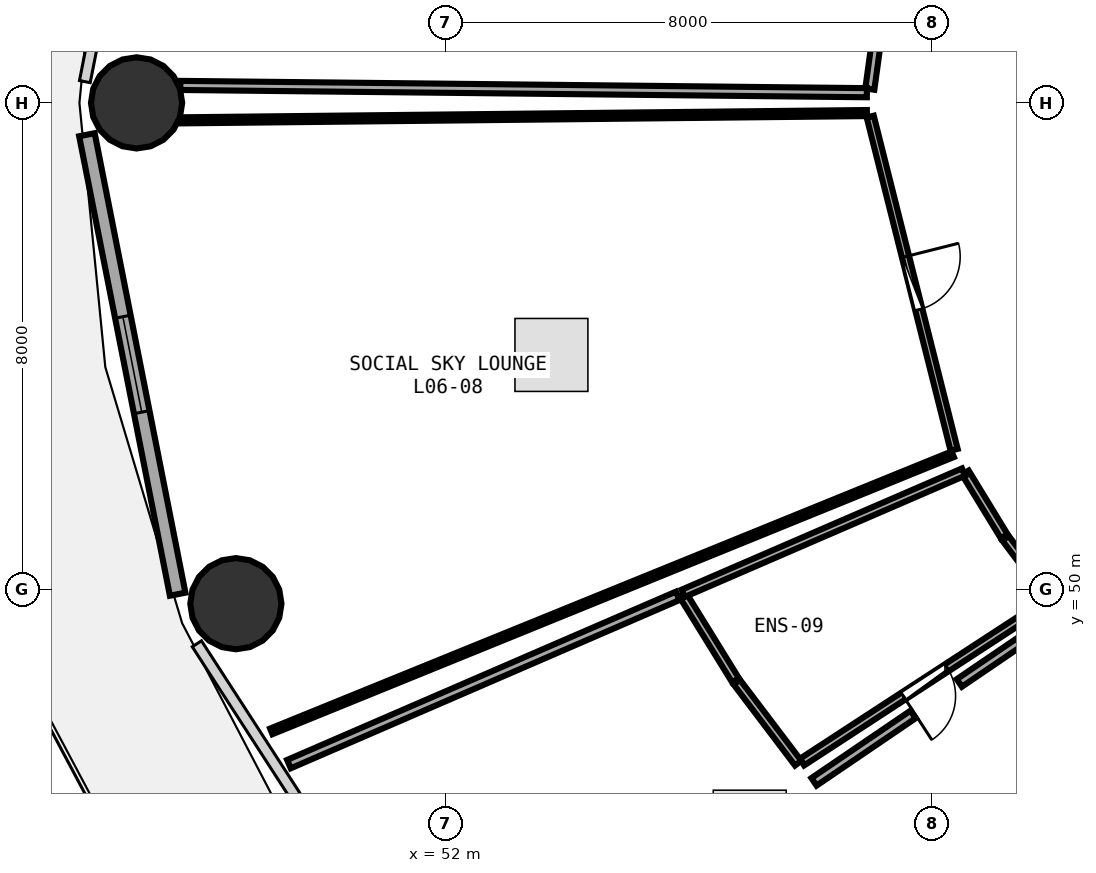
"""IFC4 building model, lengths in metres.
Left out: names, types, materials, properties, quantities, classifications, styles, units other than length and angle.
Written with IfcOpenShell. Run it as: python <this file> out.ifc"""

import sys

from ifc_helpers import new_model, si_unit, direction, frame, frame_2d, origin, origin_2d, place, context, subcontext, project, spatial, rectangle, circle, extrude, element, fill, save


model = new_model("IFC4")
c1 = context("Model", 3, precision=1e-05, world=origin(), true_north=direction((0.0, 1.0)))
c2 = subcontext(c1, "Body", "Model", "MODEL_VIEW")
j1 = project(units=[si_unit("LENGTHUNIT", "METRE"), si_unit("PLANEANGLEUNIT", "RADIAN")], contexts=[c1])
p1 = place(None, origin())
s1 = spatial("IfcSite", under=j1, at=p1, CompositionType="ELEMENT")
p2 = place(p1, origin())
s2 = spatial("IfcBuilding", under=s1, at=p2, CompositionType="ELEMENT")
p3 = place(p2, frame((0.0, 0.0, 26.25)))
s3 = spatial("IfcBuildingStorey", under=s2, at=p3, CompositionType="ELEMENT", Elevation=26.25)
for number, where, z_axis, x_axis in (
    (1, (46.92, 58.0, 0.0), (0.0, 0.0, 1.0), (1.0, 0.0, 0.0)),
    (2, (48.553, 49.764, 0.0), (0.0, 0.0, 1.0), (1.0, 0.0, 0.0)),
):
    element("IfcColumn", number, at=place(p3, frame(where, z_axis=z_axis, x_axis=x_axis)), inside=s3, PredefinedType="COLUMN", context=c2, shape_type="SweptSolid", body=[
        extrude(circle(Radius=0.75, at=origin_2d()), origin(), (0.0, 0.0, 1.0), 3.75),
    ])
p4 = place(p3, frame((46.104, 57.477, 0.0), z_axis=(0.0, 0.0, 1.0), x_axis=(0.193726159581, -0.98105564322, 0.0)))
e3 = element("IfcWall", 3, at=p4, inside=s3, PredefinedType="SOLIDWALL", context=c2, shape_type="SweptSolid", body=[
    extrude(rectangle(XDim=7.703, YDim=0.26, at=frame_2d((3.851, 0.0))), origin(), (0.0, 0.0, 1.0), 3.475),
])
p5 = place(p4, frame((3.051, 0.0, 0.85)))
e4 = element("IfcOpeningElement", 4, at=p5, cuts=e3, PredefinedType="OPENING", context=c2, shape_type="SweptSolid", body=[
    extrude(rectangle(XDim=1.6, YDim=1.45, at=frame_2d((0.8, 0.725))), frame((0.0, 0.14, 0.0), z_axis=(0.0, -1.0, 0.0), x_axis=(1.0, 0.0, 0.0)), (0.0, 0.0, 1.0), 0.28),
])
p6 = place(p3, frame((59.375, 61.115, 0.0), z_axis=(0.0, 0.0, 1.0), x_axis=(-0.135838186105, -0.990731036758, 0.0)))
e5 = element("IfcWall", 5, at=p6, inside=s3, PredefinedType="PARTITIONING", context=c2, shape_type="SweptSolid", body=[
    extrude(rectangle(XDim=2.915, YDim=0.15, at=frame_2d((1.458, 0.0))), origin(), (0.0, 0.0, 1.0), 3.48),
])
p7 = place(p6, frame((0.983, 0.0, 0.0)))
e6 = element("IfcOpeningElement", 6, at=p7, cuts=e5, PredefinedType="OPENING", context=c2, shape_type="SweptSolid", body=[
    extrude(rectangle(XDim=0.95, YDim=2.08, at=frame_2d((0.475, 1.04))), frame((0.0, 0.085, 0.0), z_axis=(0.0, -1.0, 0.0), x_axis=(1.0, 0.0, 0.0)), (0.0, 0.0, 1.0), 0.17),
])
p8 = place(p3, frame((58.986, 57.775, 0.0), z_axis=(0.0, 0.0, 1.0), x_axis=(0.244192294026, -0.969726829338, 0.0)))
e7 = element("IfcWall", 7, at=p8, inside=s3, PredefinedType="PARTITIONING", context=c2, shape_type="SweptSolid", body=[
    extrude(rectangle(XDim=5.651, YDim=0.12, at=frame_2d((2.825, 0.0))), origin(), (0.0, 0.0, 1.0), 3.48),
])
p9 = place(p8, frame((2.375, 0.0, 0.0)))
e8 = element("IfcOpeningElement", 8, at=p9, cuts=e7, PredefinedType="OPENING", context=c2, shape_type="SweptSolid", body=[
    extrude(rectangle(XDim=0.9, YDim=2.08, at=frame_2d((0.45, 1.04))), frame((0.0, 0.07, 0.0), z_axis=(0.0, -1.0, 0.0), x_axis=(1.0, 0.0, 0.0)), (0.0, 0.0, 1.0), 0.14),
])
p10 = place(p3, frame((61.917, 49.8, 0.0), z_axis=(0.0, 0.0, 1.0), x_axis=(-0.837796261941, -0.545982988267, 0.0)))
e9 = element("IfcWall", 9, at=p10, inside=s3, PredefinedType="PLUMBINGWALL", context=c2, shape_type="SweptSolid", body=[
    extrude(rectangle(XDim=4.838, YDim=0.13, at=frame_2d((2.419, 0.0))), origin(), (0.0, 0.0, 1.0), 3.235),
])
p11 = place(p10, frame((1.989, 0.0, 0.0)))
e10 = element("IfcOpeningElement", 10, at=p11, cuts=e9, PredefinedType="OPENING", context=c2, shape_type="SweptSolid", body=[
    extrude(rectangle(XDim=0.86, YDim=2.05, at=frame_2d((0.43, 1.025))), frame((0.0, 0.075, 0.0), z_axis=(0.0, -1.0, 0.0), x_axis=(1.0, 0.0, 0.0)), (0.0, 0.0, 1.0), 0.15),
])
p12 = place(p3, frame((58.931, 58.167, 0.0), z_axis=(0.0, 0.0, 1.0), x_axis=(-0.999943877154, 0.010594458135, 0.0)))
e11 = element("IfcWall", 11, at=p12, inside=s3, PredefinedType="PARTITIONING", context=c2, shape_type="SweptSolid", body=[
    extrude(rectangle(XDim=11.292, YDim=0.15, at=frame_2d((5.646, 0.0))), origin(), (0.0, 0.0, 1.0), 2.875),
])
p13 = place(p3, frame((60.343, 52.222, 0.0), z_axis=(0.0, 0.0, 1.0), x_axis=(-0.926333713065, -0.376703931542, 0.0)))
e12 = element("IfcWall", 12, at=p13, inside=s3, PredefinedType="PARTITIONING", context=c2, shape_type="SweptSolid", body=[
    extrude(rectangle(XDim=12.099, YDim=0.1, at=frame_2d((6.05, 0.0))), origin(), (0.0, 0.0, 1.0), 2.875),
])
p14 = place(p3, frame((47.64, 57.713, 0.0), z_axis=(0.0, 0.0, 1.0), x_axis=(0.999943877154, 0.010594458135, 0.0)))
e13 = element("IfcWall", 13, at=p14, inside=s3, PredefinedType="PARTITIONING", context=c2, shape_type="SweptSolid", body=[
    extrude(rectangle(XDim=11.292, YDim=0.1, at=frame_2d((5.646, 0.0))), origin(), (0.0, 0.0, 1.0), 2.875),
])
p15 = place(p3, frame((60.549, 51.92, 0.0), z_axis=(0.0, 0.0, 1.0), x_axis=(0.52146609248, -0.853272004928, 0.0)))
e14 = element("IfcWall", 14, at=p15, inside=s3, PredefinedType="PLUMBINGWALL", context=c2, shape_type="SweptSolid", body=[
    extrude(rectangle(XDim=1.228, YDim=0.13, at=frame_2d((0.614, 0.0))), origin(), (0.0, 0.0, 1.0), 3.48),
])
p16 = place(p3, frame((61.212, 50.839, 0.0), z_axis=(0.0, 0.0, 1.0), x_axis=(0.600347056143, -0.79973959023, 0.0)))
e15 = element("IfcWall", 15, at=p16, inside=s3, PredefinedType="PLUMBINGWALL", context=c2, shape_type="SweptSolid", body=[
    extrude(rectangle(XDim=1.238, YDim=0.13, at=frame_2d((0.619, 0.0))), origin(), (0.0, 0.0, 1.0), 2.875),
])
p17 = place(p3, frame((57.801, 47.142, 0.0), z_axis=(0.0, 0.0, 1.0), x_axis=(-0.60376191721, 0.797164692725, 0.0)))
e16 = element("IfcWall", 16, at=p17, inside=s3, PredefinedType="PLUMBINGWALL", context=c2, shape_type="SweptSolid", body=[
    extrude(rectangle(XDim=1.669, YDim=0.13, at=frame_2d((0.834, 0.0))), origin(), (0.0, 0.0, 1.0), 3.175),
])
p18 = place(p3, frame((56.771, 48.505, 0.0), z_axis=(0.0, 0.0, 1.0), x_axis=(-0.525540089642, 0.850768837099, 0.0)))
e17 = element("IfcWall", 17, at=p18, inside=s3, PredefinedType="PLUMBINGWALL", context=c2, shape_type="SweptSolid", body=[
    extrude(rectangle(XDim=1.651, YDim=0.13, at=frame_2d((0.826, 0.0))), origin(), (0.0, 0.0, 1.0), 3.175),
])
p19 = place(p3, frame((55.91, 49.935, 0.0), z_axis=(0.0, 0.0, 1.0), x_axis=(0.917797204715, 0.397049481826, 0.0)))
e18 = element("IfcWall", 18, at=p19, inside=s3, PredefinedType="PLUMBINGWALL", context=c2, shape_type="SweptSolid", body=[
    extrude(rectangle(XDim=5.023, YDim=0.13, at=frame_2d((2.511, 0.0))), origin(), (0.0, 0.0, 1.0), 2.875),
])
p20 = place(p3, frame((64.458, 47.419, 0.0), z_axis=(0.0, 0.0, 1.0), x_axis=(-0.684261294523, -0.729236916796, 0.0)))
e19 = element("IfcWall", 19, at=p20, inside=s3, PredefinedType="PARTITIONING", context=c2, shape_type="SweptSolid", body=[
    extrude(rectangle(XDim=11.438, YDim=0.15, at=frame_2d((5.719, 0.0))), origin(), (0.0, 0.0, 1.0), 2.875),
])
p21 = place(p3, frame((49.426, 47.126, 0.0), z_axis=(0.0, 0.0, 1.0), x_axis=(0.917736225937, 0.397190407239, 0.0)))
e20 = element("IfcWall", 20, at=p21, inside=s3, PredefinedType="PARTITIONING", context=c2, shape_type="SweptSolid", body=[
    extrude(rectangle(XDim=6.967, YDim=0.15, at=frame_2d((3.483, 0.0))), origin(), (0.0, 0.0, 1.0), 2.875),
])
p22 = place(p3, frame((58.061, 46.834, 0.0), z_axis=(0.0, 0.0, 1.0), x_axis=(0.826811291248, 0.562479411769, 0.0)))
e21 = element("IfcWall", 21, at=p22, inside=s3, PredefinedType="PARTITIONING", context=c2, shape_type="SweptSolid", body=[
    extrude(rectangle(XDim=1.971, YDim=0.15, at=frame_2d((0.985, 0.0))), origin(), (0.0, 0.0, 1.0), 3.48),
])
p23 = place(p3, frame((60.451, 48.461, 0.0), z_axis=(0.0, 0.0, 1.0), x_axis=(0.826867883695, 0.562396215237, 0.0)))
e22 = element("IfcWall", 22, at=p23, inside=s3, PredefinedType="PARTITIONING", context=c2, shape_type="SweptSolid", body=[
    extrude(rectangle(XDim=2.014, YDim=0.15, at=frame_2d((1.007, 0.0))), origin(), (0.0, 0.0, 1.0), 3.235),
])
p24 = place(p3, frame((57.156, 38.706, 0.0), z_axis=(0.0, 0.0, 1.0), x_axis=(0.66580890104, 0.746122313897, 0.0)))
e23 = element("IfcWall", 23, at=p24, inside=s3, PredefinedType="PARTITIONING", context=c2, shape_type="SweptSolid", body=[
    extrude(rectangle(XDim=11.399, YDim=0.1, at=frame_2d((5.7, 0.0))), origin(), (0.0, 0.0, 1.0), 2.875),
])
p25 = place(p5, origin())
e24 = element("IfcWindow", 24, at=p25, inside=s3, PartitioningType="SINGLE_PANEL", PredefinedType="WINDOW", context=c2, shape_type="SweptSolid", body=[
    extrude(rectangle(XDim=1.6, YDim=1.45, at=frame_2d((0.8, 0.725))), frame((0.0, 0.03, 0.0), z_axis=(0.0, -1.0, 0.0), x_axis=(1.0, 0.0, 0.0)), (0.0, 0.0, 1.0), 0.06),
])
fill(e4, e24)
p26 = place(p9, origin())
e25 = element("IfcDoor", 25, at=p26, inside=s3, OperationType="SINGLE_SWING_LEFT", PredefinedType="DOOR", context=c2, shape_type="SweptSolid", body=[
    extrude(rectangle(XDim=0.9, YDim=2.08, at=frame_2d((0.45, 1.04))), frame((0.0, 0.025, 0.0), z_axis=(0.0, -1.0, 0.0), x_axis=(1.0, 0.0, 0.0)), (0.0, 0.0, 1.0), 0.05),
])
fill(e8, e25)
p27 = place(p11, origin())
e26 = element("IfcDoor", 26, at=p27, inside=s3, OperationType="SINGLE_SWING_RIGHT", PredefinedType="DOOR", context=c2, shape_type="SweptSolid", body=[
    extrude(rectangle(XDim=0.86, YDim=2.05, at=frame_2d((0.43, 1.025))), frame((0.0, 0.025, 0.0), z_axis=(0.0, -1.0, 0.0), x_axis=(1.0, 0.0, 0.0)), (0.0, 0.0, 1.0), 0.05),
])
fill(e10, e26)
save(model, sys.argv[1])
